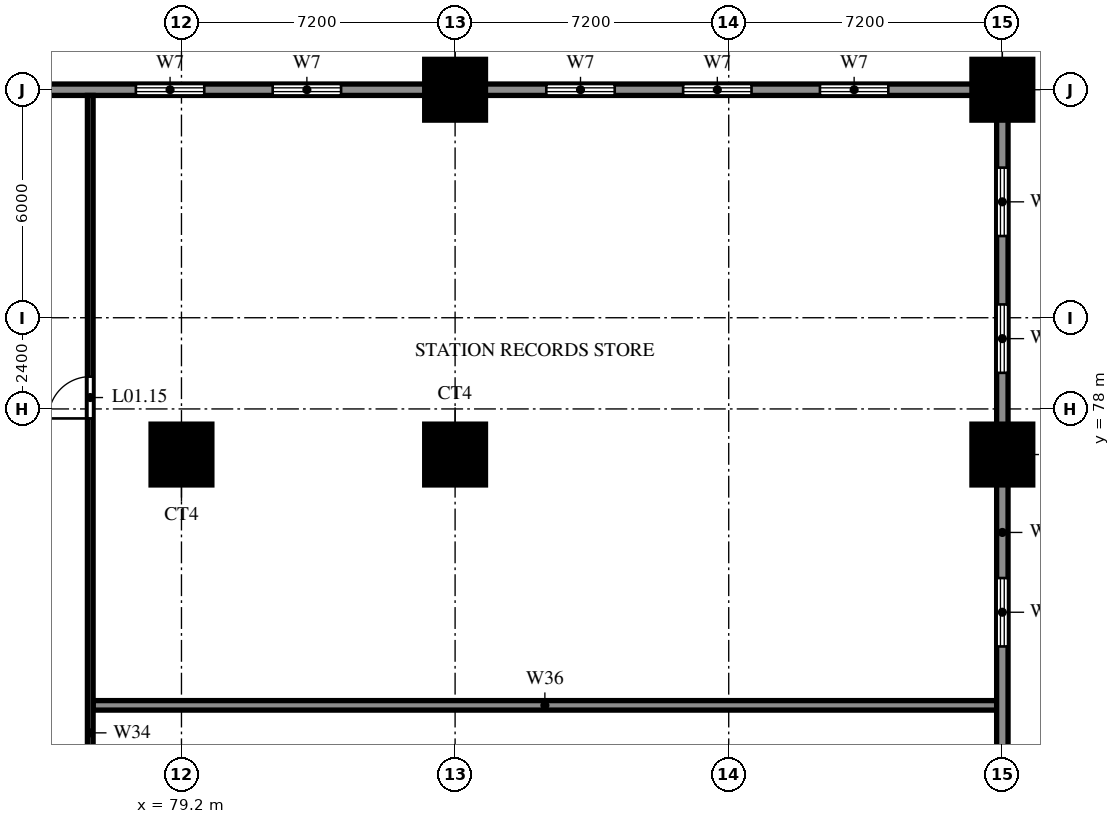
"""IFC4 building model, lengths in metres.
Left out: names, types, materials, properties, quantities, classifications, styles, units other than length and angle.
Written with IfcOpenShell. Run it as: python <this file> out.ifc"""

import sys

from ifc_helpers import new_model, si_unit, direction, frame, frame_2d, origin, origin_2d, place, context, subcontext, project, spatial, rectangle, circle, extrude, source, transform, mapped, element, fill, save


model = new_model("IFC4")
c1 = context("Model", 3, precision=1e-05, world=origin(), true_north=direction((0.0, 1.0)))
c2 = subcontext(c1, "Body", "Model", "MODEL_VIEW")
j1 = project(units=[si_unit("LENGTHUNIT", "METRE"), si_unit("PLANEANGLEUNIT", "RADIAN")], contexts=[c1])
p1 = place(None, origin())
s1 = spatial("IfcSite", under=j1, at=p1, CompositionType="ELEMENT")
p2 = place(p1, origin())
s2 = spatial("IfcBuilding", under=s1, at=p2, CompositionType="ELEMENT")
p3 = place(p2, frame((0.0, 0.0, 7.8)))
s3 = spatial("IfcBuildingStorey", under=s2, at=p3, CompositionType="ELEMENT", Elevation=7.8)
m1 = source(origin(), c2, "Body", "SweptSolid", [
    extrude(circle(Radius=0.8, at=origin_2d()), origin(), (0.0, 0.0, 1.0), 5.0),
])
for number, where, z_axis, x_axis in (
    (1, (79.2, 76.8, 0.0), (0.0, 0.0, 1.0), (1.0, 0.0, 0.0)),
    (2, (86.4, 76.8, 0.0), (0.0, 0.0, 1.0), (1.0, 0.0, 0.0)),
    (3, (100.8, 76.8, 0.0), (0.0, 0.0, 1.0), (1.0, 0.0, 0.0)),
    (4, (86.4, 86.4, 0.0), (0.0, 0.0, 1.0), (1.0, 0.0, 0.0)),
    (5, (100.8, 86.4, 0.0), (0.0, 0.0, 1.0), (1.0, 0.0, 0.0)),
):
    element("IfcColumn", number, at=place(p3, frame(where, z_axis=z_axis, x_axis=x_axis)), inside=s3, PredefinedType="COLUMN", context=c2, shape_type="MappedRepresentation", body=[
        mapped(m1, transform((0.0, 0.0, 0.0))),
    ])
p4 = place(p3, frame((76.875, 70.2, 0.0), z_axis=(0.0, 0.0, 1.0), x_axis=(1.0, 0.0, 0.0)))
e6 = element("IfcWall", 6, at=p4, inside=s3, PredefinedType="SOLIDWALL", context=c2, shape_type="SweptSolid", body=[
    extrude(rectangle(XDim=23.775, YDim=0.25, at=frame_2d((11.887, 0.0))), origin(), (0.0, 0.0, 1.0), 3.8),
])
p5 = place(p3, frame((0.0, 86.4, 0.0), z_axis=(0.0, 0.0, 1.0), x_axis=(1.0, 0.0, 0.0)))
e7 = element("IfcWall", 7, at=p5, inside=s3, PredefinedType="SOLIDWALL", context=c2, shape_type="SweptSolid", body=[
    extrude(rectangle(XDim=100.8, YDim=0.3, at=frame_2d((50.4, 0.0))), origin(), (0.0, 0.0, 1.0), 5.0),
])
p6 = place(p5, frame((2.4, 0.0, 0.6)))
e8 = element("IfcOpeningElement", 8, at=p6, cuts=e7, PredefinedType="OPENING", context=c2, shape_type="SweptSolid", body=[
    extrude(rectangle(XDim=1.8, YDim=2.4, at=frame_2d((0.9, 1.2))), frame((0.0, 0.16, 0.0), z_axis=(0.0, -1.0, 0.0), x_axis=(1.0, 0.0, 0.0)), (0.0, 0.0, 1.0), 0.32),
])
p7 = place(p5, frame((6.0, 0.0, 0.6)))
e9 = element("IfcOpeningElement", 9, at=p7, cuts=e7, PredefinedType="OPENING", context=c2, shape_type="SweptSolid", body=[
    extrude(rectangle(XDim=1.8, YDim=2.4, at=frame_2d((0.9, 1.2))), frame((0.0, 0.16, 0.0), z_axis=(0.0, -1.0, 0.0), x_axis=(1.0, 0.0, 0.0)), (0.0, 0.0, 1.0), 0.32),
])
p8 = place(p5, frame((9.6, 0.0, 0.6)))
e10 = element("IfcOpeningElement", 10, at=p8, cuts=e7, PredefinedType="OPENING", context=c2, shape_type="SweptSolid", body=[
    extrude(rectangle(XDim=1.8, YDim=2.4, at=frame_2d((0.9, 1.2))), frame((0.0, 0.16, 0.0), z_axis=(0.0, -1.0, 0.0), x_axis=(1.0, 0.0, 0.0)), (0.0, 0.0, 1.0), 0.32),
])
p9 = place(p5, frame((16.8, 0.0, 0.6)))
e11 = element("IfcOpeningElement", 11, at=p9, cuts=e7, PredefinedType="OPENING", context=c2, shape_type="SweptSolid", body=[
    extrude(rectangle(XDim=1.8, YDim=2.4, at=frame_2d((0.9, 1.2))), frame((0.0, 0.16, 0.0), z_axis=(0.0, -1.0, 0.0), x_axis=(1.0, 0.0, 0.0)), (0.0, 0.0, 1.0), 0.32),
])
p10 = place(p5, frame((20.4, 0.0, 0.6)))
e12 = element("IfcOpeningElement", 12, at=p10, cuts=e7, PredefinedType="OPENING", context=c2, shape_type="SweptSolid", body=[
    extrude(rectangle(XDim=1.8, YDim=2.4, at=frame_2d((0.9, 1.2))), frame((0.0, 0.16, 0.0), z_axis=(0.0, -1.0, 0.0), x_axis=(1.0, 0.0, 0.0)), (0.0, 0.0, 1.0), 0.32),
])
p11 = place(p5, frame((78.0, 0.0, 0.6)))
e13 = element("IfcOpeningElement", 13, at=p11, cuts=e7, PredefinedType="OPENING", context=c2, shape_type="SweptSolid", body=[
    extrude(rectangle(XDim=1.8, YDim=2.4, at=frame_2d((0.9, 1.2))), frame((0.0, 0.16, 0.0), z_axis=(0.0, -1.0, 0.0), x_axis=(1.0, 0.0, 0.0)), (0.0, 0.0, 1.0), 0.32),
])
p12 = place(p5, frame((81.6, 0.0, 0.6)))
e14 = element("IfcOpeningElement", 14, at=p12, cuts=e7, PredefinedType="OPENING", context=c2, shape_type="SweptSolid", body=[
    extrude(rectangle(XDim=1.8, YDim=2.4, at=frame_2d((0.9, 1.2))), frame((0.0, 0.16, 0.0), z_axis=(0.0, -1.0, 0.0), x_axis=(1.0, 0.0, 0.0)), (0.0, 0.0, 1.0), 0.32),
])
p13 = place(p5, frame((88.8, 0.0, 0.6)))
e15 = element("IfcOpeningElement", 15, at=p13, cuts=e7, PredefinedType="OPENING", context=c2, shape_type="SweptSolid", body=[
    extrude(rectangle(XDim=1.8, YDim=2.4, at=frame_2d((0.9, 1.2))), frame((0.0, 0.16, 0.0), z_axis=(0.0, -1.0, 0.0), x_axis=(1.0, 0.0, 0.0)), (0.0, 0.0, 1.0), 0.32),
])
p14 = place(p5, frame((92.4, 0.0, 0.6)))
e16 = element("IfcOpeningElement", 16, at=p14, cuts=e7, PredefinedType="OPENING", context=c2, shape_type="SweptSolid", body=[
    extrude(rectangle(XDim=1.8, YDim=2.4, at=frame_2d((0.9, 1.2))), frame((0.0, 0.16, 0.0), z_axis=(0.0, -1.0, 0.0), x_axis=(1.0, 0.0, 0.0)), (0.0, 0.0, 1.0), 0.32),
])
p15 = place(p5, frame((96.0, 0.0, 0.6)))
e17 = element("IfcOpeningElement", 17, at=p15, cuts=e7, PredefinedType="OPENING", context=c2, shape_type="SweptSolid", body=[
    extrude(rectangle(XDim=1.8, YDim=2.4, at=frame_2d((0.9, 1.2))), frame((0.0, 0.16, 0.0), z_axis=(0.0, -1.0, 0.0), x_axis=(1.0, 0.0, 0.0)), (0.0, 0.0, 1.0), 0.32),
])
p16 = place(p3, frame((76.8, 54.3, 0.0), z_axis=(0.0, 0.0, 1.0), x_axis=(0.0, 1.0, 0.0)))
e18 = element("IfcWall", 18, at=p16, inside=s3, PredefinedType="PARTITIONING", context=c2, shape_type="SweptSolid", body=[
    extrude(rectangle(XDim=31.95, YDim=0.15, at=frame_2d((15.975, 0.0))), origin(), (0.0, 0.0, 1.0), 3.8),
])
p17 = place(p16, frame((11.0, 0.0, 0.0)))
e19 = element("IfcOpeningElement", 19, at=p17, cuts=e18, PredefinedType="OPENING", context=c2, shape_type="SweptSolid", body=[
    extrude(rectangle(XDim=1.1, YDim=2.1, at=frame_2d((0.55, 1.05))), frame((0.0, 0.085, 0.0), z_axis=(0.0, -1.0, 0.0), x_axis=(1.0, 0.0, 0.0)), (0.0, 0.0, 1.0), 0.17),
])
p18 = place(p16, frame((23.45, 0.0, 0.0)))
e20 = element("IfcOpeningElement", 20, at=p18, cuts=e18, PredefinedType="OPENING", context=c2, shape_type="SweptSolid", body=[
    extrude(rectangle(XDim=1.1, YDim=2.1, at=frame_2d((0.55, 1.05))), frame((0.0, 0.085, 0.0), z_axis=(0.0, -1.0, 0.0), x_axis=(1.0, 0.0, 0.0)), (0.0, 0.0, 1.0), 0.17),
])
p19 = place(p3, frame((100.8, 63.1, 0.0), z_axis=(0.0, 0.0, 1.0), x_axis=(0.0, 1.0, 0.0)))
e21 = element("IfcWall", 21, at=p19, inside=s3, PredefinedType="SOLIDWALL", context=c2, shape_type="SweptSolid", body=[
    extrude(rectangle(XDim=23.3, YDim=0.3, at=frame_2d((11.65, 0.0))), origin(), (0.0, 0.0, 1.0), 5.0),
])
p20 = place(p19, frame((1.45, 0.0, 0.6)))
e22 = element("IfcOpeningElement", 22, at=p20, cuts=e21, PredefinedType="OPENING", context=c2, shape_type="SweptSolid", body=[
    extrude(rectangle(XDim=1.8, YDim=2.4, at=frame_2d((0.9, 1.2))), frame((0.0, 0.16, 0.0), z_axis=(0.0, -1.0, 0.0), x_axis=(1.0, 0.0, 0.0)), (0.0, 0.0, 1.0), 0.32),
])
p21 = place(p19, frame((3.55, 0.0, 0.6)))
e23 = element("IfcOpeningElement", 23, at=p21, cuts=e21, PredefinedType="OPENING", context=c2, shape_type="SweptSolid", body=[
    extrude(rectangle(XDim=1.8, YDim=2.4, at=frame_2d((0.9, 1.2))), frame((0.0, 0.16, 0.0), z_axis=(0.0, -1.0, 0.0), x_axis=(1.0, 0.0, 0.0)), (0.0, 0.0, 1.0), 0.32),
])
p22 = place(p19, frame((8.65, 0.0, 0.6)))
e24 = element("IfcOpeningElement", 24, at=p22, cuts=e21, PredefinedType="OPENING", context=c2, shape_type="SweptSolid", body=[
    extrude(rectangle(XDim=1.8, YDim=2.4, at=frame_2d((0.9, 1.2))), frame((0.0, 0.16, 0.0), z_axis=(0.0, -1.0, 0.0), x_axis=(1.0, 0.0, 0.0)), (0.0, 0.0, 1.0), 0.32),
])
p23 = place(p19, frame((15.85, 0.0, 0.6)))
e25 = element("IfcOpeningElement", 25, at=p23, cuts=e21, PredefinedType="OPENING", context=c2, shape_type="SweptSolid", body=[
    extrude(rectangle(XDim=1.8, YDim=2.4, at=frame_2d((0.9, 1.2))), frame((0.0, 0.16, 0.0), z_axis=(0.0, -1.0, 0.0), x_axis=(1.0, 0.0, 0.0)), (0.0, 0.0, 1.0), 0.32),
])
p24 = place(p19, frame((19.45, 0.0, 0.6)))
e26 = element("IfcOpeningElement", 26, at=p24, cuts=e21, PredefinedType="OPENING", context=c2, shape_type="SweptSolid", body=[
    extrude(rectangle(XDim=1.8, YDim=2.4, at=frame_2d((0.9, 1.2))), frame((0.0, 0.16, 0.0), z_axis=(0.0, -1.0, 0.0), x_axis=(1.0, 0.0, 0.0)), (0.0, 0.0, 1.0), 0.32),
])
p25 = place(p18, origin())
e27 = element("IfcDoor", 27, at=p25, inside=s3, OperationType="SINGLE_SWING_RIGHT", PredefinedType="DOOR", context=c2, shape_type="SweptSolid", body=[
    extrude(rectangle(XDim=1.1, YDim=2.1, at=frame_2d((0.55, 1.05))), frame((0.0, 0.025, 0.0), z_axis=(0.0, -1.0, 0.0), x_axis=(1.0, 0.0, 0.0)), (0.0, 0.0, 1.0), 0.05),
])
fill(e20, e27)
p26 = place(p11, origin())
e28 = element("IfcWindow", 28, at=p26, inside=s3, PartitioningType="DOUBLE_PANEL_VERTICAL", PredefinedType="WINDOW", context=c2, shape_type="SweptSolid", body=[
    extrude(rectangle(XDim=1.8, YDim=2.4, at=frame_2d((0.9, 1.2))), frame((0.0, 0.03, 0.0), z_axis=(0.0, -1.0, 0.0), x_axis=(1.0, 0.0, 0.0)), (0.0, 0.0, 1.0), 0.06),
])
fill(e13, e28)
p27 = place(p12, origin())
e29 = element("IfcWindow", 29, at=p27, inside=s3, PartitioningType="DOUBLE_PANEL_VERTICAL", PredefinedType="WINDOW", context=c2, shape_type="SweptSolid", body=[
    extrude(rectangle(XDim=1.8, YDim=2.4, at=frame_2d((0.9, 1.2))), frame((0.0, 0.03, 0.0), z_axis=(0.0, -1.0, 0.0), x_axis=(1.0, 0.0, 0.0)), (0.0, 0.0, 1.0), 0.06),
])
fill(e14, e29)
p28 = place(p13, origin())
e30 = element("IfcWindow", 30, at=p28, inside=s3, PartitioningType="DOUBLE_PANEL_VERTICAL", PredefinedType="WINDOW", context=c2, shape_type="SweptSolid", body=[
    extrude(rectangle(XDim=1.8, YDim=2.4, at=frame_2d((0.9, 1.2))), frame((0.0, 0.03, 0.0), z_axis=(0.0, -1.0, 0.0), x_axis=(1.0, 0.0, 0.0)), (0.0, 0.0, 1.0), 0.06),
])
fill(e15, e30)
p29 = place(p14, origin())
e31 = element("IfcWindow", 31, at=p29, inside=s3, PartitioningType="DOUBLE_PANEL_VERTICAL", PredefinedType="WINDOW", context=c2, shape_type="SweptSolid", body=[
    extrude(rectangle(XDim=1.8, YDim=2.4, at=frame_2d((0.9, 1.2))), frame((0.0, 0.03, 0.0), z_axis=(0.0, -1.0, 0.0), x_axis=(1.0, 0.0, 0.0)), (0.0, 0.0, 1.0), 0.06),
])
fill(e16, e31)
p30 = place(p15, origin())
e32 = element("IfcWindow", 32, at=p30, inside=s3, PartitioningType="DOUBLE_PANEL_VERTICAL", PredefinedType="WINDOW", context=c2, shape_type="SweptSolid", body=[
    extrude(rectangle(XDim=1.8, YDim=2.4, at=frame_2d((0.9, 1.2))), frame((0.0, 0.03, 0.0), z_axis=(0.0, -1.0, 0.0), x_axis=(1.0, 0.0, 0.0)), (0.0, 0.0, 1.0), 0.06),
])
fill(e17, e32)
p31 = place(p22, origin())
e33 = element("IfcWindow", 33, at=p31, inside=s3, PartitioningType="DOUBLE_PANEL_VERTICAL", PredefinedType="WINDOW", context=c2, shape_type="SweptSolid", body=[
    extrude(rectangle(XDim=1.8, YDim=2.4, at=frame_2d((0.9, 1.2))), frame((0.0, 0.03, 0.0), z_axis=(0.0, -1.0, 0.0), x_axis=(1.0, 0.0, 0.0)), (0.0, 0.0, 1.0), 0.06),
])
fill(e24, e33)
p32 = place(p23, origin())
e34 = element("IfcWindow", 34, at=p32, inside=s3, PartitioningType="DOUBLE_PANEL_VERTICAL", PredefinedType="WINDOW", context=c2, shape_type="SweptSolid", body=[
    extrude(rectangle(XDim=1.8, YDim=2.4, at=frame_2d((0.9, 1.2))), frame((0.0, 0.03, 0.0), z_axis=(0.0, -1.0, 0.0), x_axis=(1.0, 0.0, 0.0)), (0.0, 0.0, 1.0), 0.06),
])
fill(e25, e34)
p33 = place(p24, origin())
e35 = element("IfcWindow", 35, at=p33, inside=s3, PartitioningType="DOUBLE_PANEL_VERTICAL", PredefinedType="WINDOW", context=c2, shape_type="SweptSolid", body=[
    extrude(rectangle(XDim=1.8, YDim=2.4, at=frame_2d((0.9, 1.2))), frame((0.0, 0.03, 0.0), z_axis=(0.0, -1.0, 0.0), x_axis=(1.0, 0.0, 0.0)), (0.0, 0.0, 1.0), 0.06),
])
fill(e26, e35)
save(model, sys.argv[1])
